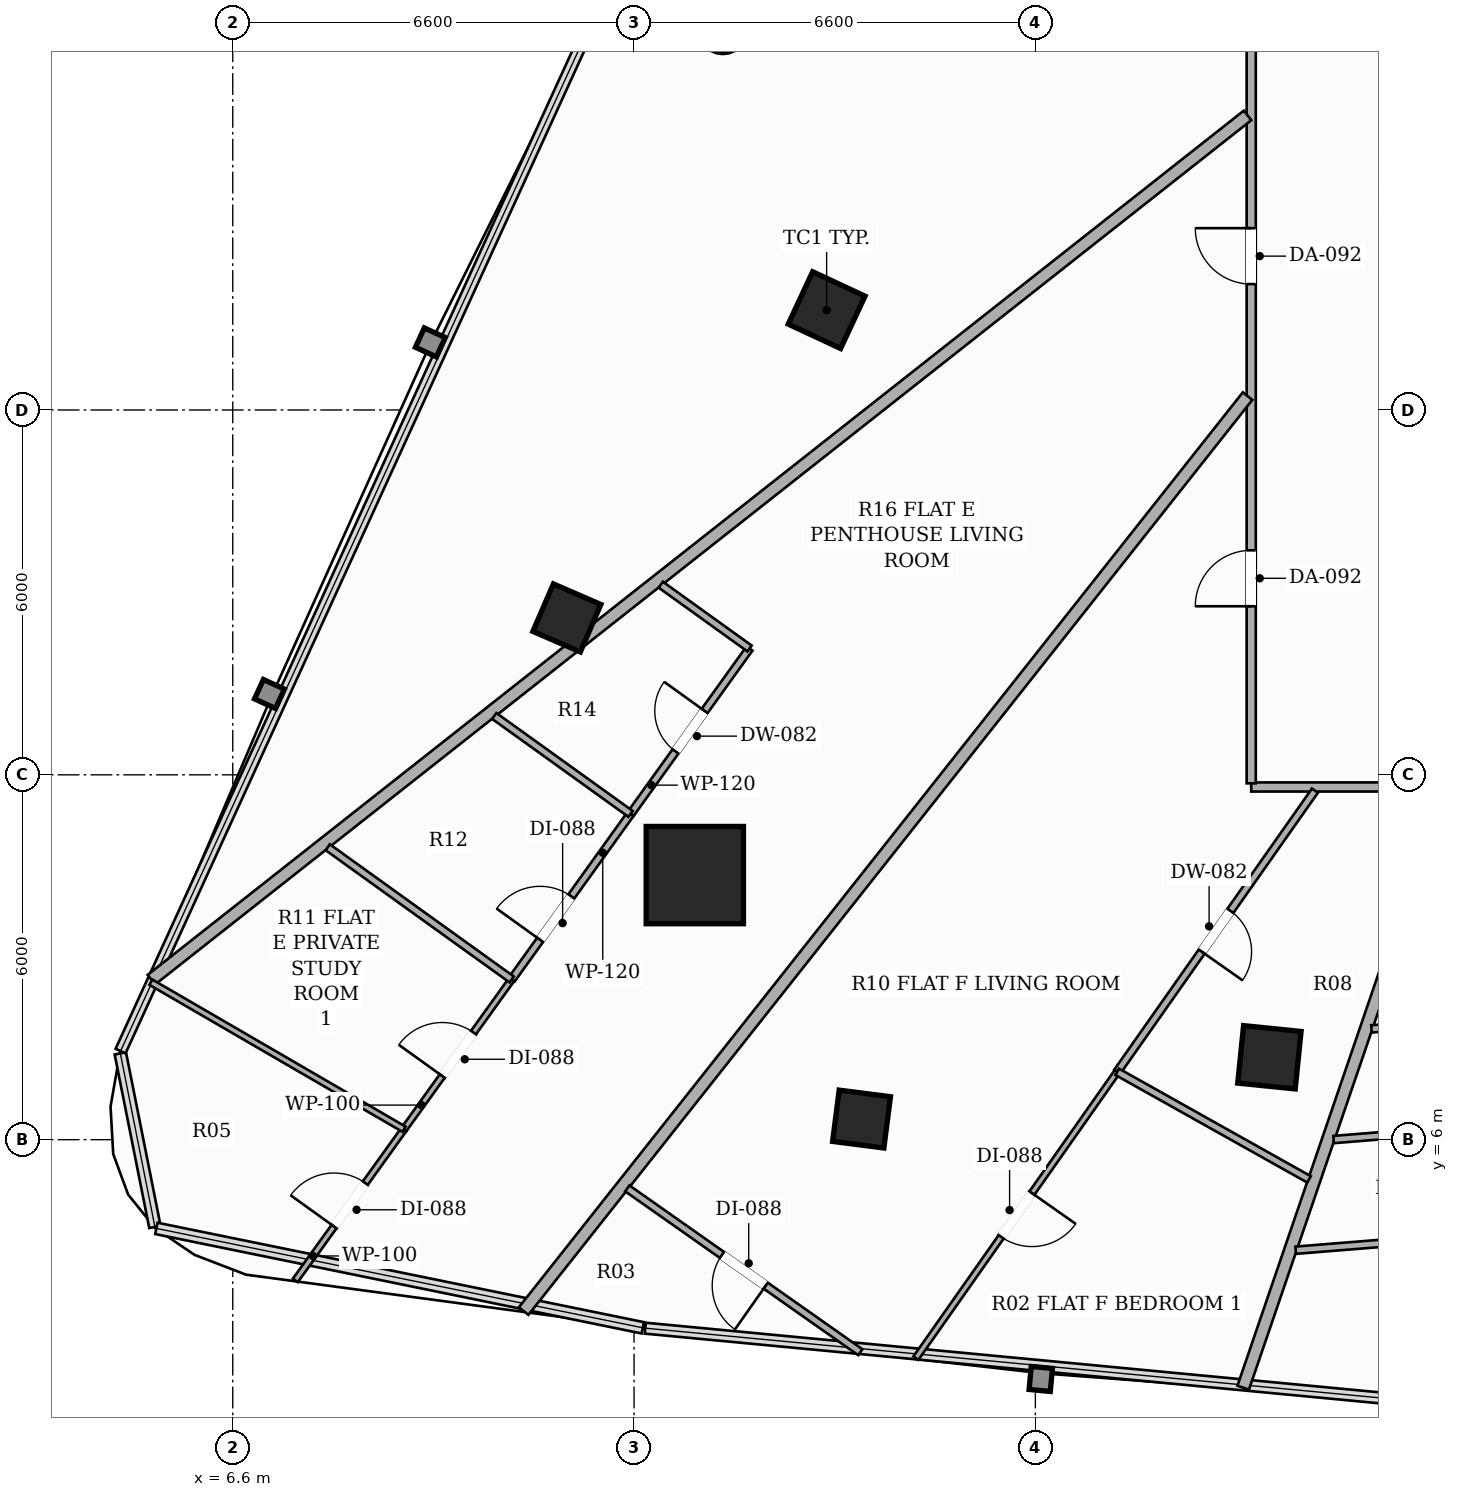
"""IFC4 building model, lengths in metres.
Left out: names, types, materials, properties, quantities, classifications, styles, units other than length and angle.
Written with IfcOpenShell. Run it as: python <this file> out.ifc"""

import sys

from ifc_helpers import new_model, si_unit, direction, frame, frame_2d, origin, origin_2d, place, context, subcontext, project, spatial, rectangle, hollow_rectangle, hollow_circle, extrude, element, fill, save


model = new_model("IFC4")
c1 = context("Model", 3, precision=1e-05, world=origin(), true_north=direction((0.0, 1.0)))
c2 = subcontext(c1, "Body", "Model", "MODEL_VIEW")
j1 = project(units=[si_unit("LENGTHUNIT", "METRE"), si_unit("PLANEANGLEUNIT", "RADIAN")], contexts=[c1])
p1 = place(None, origin())
s1 = spatial("IfcSite", under=j1, at=p1, CompositionType="ELEMENT")
p2 = place(p1, origin())
s2 = spatial("IfcBuilding", under=s1, at=p2, CompositionType="ELEMENT")
p3 = place(p2, frame((0.0, 0.0, 56.6)))
s3 = spatial("IfcBuildingStorey", under=s2, at=p3, CompositionType="ELEMENT", Elevation=56.6)
p4 = place(p3, frame((14.199, 10.351, 0.0), z_axis=(0.0, 0.0, 1.0), x_axis=(1.0, 0.0, 0.0)))
e1 = element("IfcColumn", 1, at=p4, inside=s3, PredefinedType="COLUMN", context=c2, shape_type="SweptSolid", body=[
    extrude(hollow_rectangle(XDim=1.6, YDim=1.6, WallThickness=0.05, at=origin_2d()), origin(), (0.0, 0.0, 1.0), 3.3),
])
for number, where, z_axis, x_axis in (
    (2, (16.367, 19.642, 0.0), (0.0, 0.0, 1.0), (0.423, 0.906, 0.0)),
    (3, (23.649, 7.355, 0.0), (0.0, 0.0, 1.0), (-0.995, 0.101, 0.0)),
):
    element("IfcColumn", number, at=place(p3, frame(where, z_axis=z_axis, x_axis=x_axis)), inside=s3, PredefinedType="COLUMN", context=c2, shape_type="SweptSolid", body=[
        extrude(hollow_rectangle(XDim=0.95, YDim=0.95, WallThickness=0.032, at=origin_2d()), origin(), (0.0, 0.0, 1.0), 3.3),
    ])
for number, where, z_axis, x_axis in (
    (4, (12.095, 14.58, 0.0), (0.0, 0.0, 1.0), (0.397, 0.918, 0.0)),
    (5, (16.941, 6.339, 0.0), (0.0, 0.0, 1.0), (-0.992, 0.127, 0.0)),
):
    element("IfcColumn", number, at=place(p3, frame(where, z_axis=z_axis, x_axis=x_axis)), inside=s3, PredefinedType="COLUMN", context=c2, shape_type="SweptSolid", body=[
        extrude(hollow_rectangle(XDim=0.85, YDim=0.85, WallThickness=0.028, at=origin_2d()), origin(), (0.0, 0.0, 1.0), 3.3),
    ])
p5 = place(p3, frame((14.662, 24.256, 0.0), z_axis=(0.0, 0.0, 1.0), x_axis=(1.0, 0.0, 0.0)))
e6 = element("IfcColumn", 6, at=p5, inside=s3, PredefinedType="COLUMN", context=c2, shape_type="SweptSolid", body=[
    extrude(hollow_circle(Radius=0.381, WallThickness=0.022, at=origin_2d()), origin(), (0.0, 0.0, 1.0), 3.3),
])
p6 = place(p3, frame((42.59, 11.8, 0.0), z_axis=(0.0, 0.0, 1.0), x_axis=(-1.0, 0.0, 0.0)))
e7 = element("IfcWall", 7, at=p6, inside=s3, PredefinedType="PARTITIONING", context=c2, shape_type="SweptSolid", body=[
    extrude(rectangle(XDim=19.24, YDim=0.15, at=frame_2d((9.62, 0.0))), origin(), (0.0, 0.0, 1.0), 2.629),
])
p7 = place(p6, frame((11.355, 0.0, 0.0)))
e8 = element("IfcOpeningElement", 8, at=p7, cuts=e7, PredefinedType="OPENING", context=c2, shape_type="SweptSolid", body=[
    extrude(rectangle(XDim=0.92, YDim=2.15, at=frame_2d((0.46, 1.075))), frame((0.0, 0.085, 0.0), z_axis=(0.0, -1.0, 0.0), x_axis=(1.0, 0.0, 0.0)), (0.0, 0.0, 1.0), 0.17),
])
p8 = place(p6, frame((3.524, 0.0, 0.0)))
e9 = element("IfcOpeningElement", 9, at=p8, cuts=e7, PredefinedType="OPENING", context=c2, shape_type="SweptSolid", body=[
    extrude(rectangle(XDim=0.88, YDim=2.1, at=frame_2d((0.44, 1.05))), frame((0.0, 0.085, 0.0), z_axis=(0.0, -1.0, 0.0), x_axis=(1.0, 0.0, 0.0)), (0.0, 0.0, 1.0), 0.17),
])
p9 = place(p3, frame((23.35, 11.86, 0.0), z_axis=(0.0, 0.0, 1.0), x_axis=(0.0, 1.0, 0.0)))
e10 = element("IfcWall", 10, at=p9, inside=s3, PredefinedType="PARTITIONING", context=c2, shape_type="SweptSolid", body=[
    extrude(rectangle(XDim=25.04, YDim=0.15, at=frame_2d((12.52, 0.0))), origin(), (0.0, 0.0, 1.0), 2.373),
])
p10 = place(p9, frame((15.434, 0.0, 0.0)))
e11 = element("IfcOpeningElement", 11, at=p10, cuts=e10, PredefinedType="OPENING", context=c2, shape_type="SweptSolid", body=[
    extrude(rectangle(XDim=0.88, YDim=2.1, at=frame_2d((0.44, 1.05))), frame((0.0, 0.085, 0.0), z_axis=(0.0, -1.0, 0.0), x_axis=(1.0, 0.0, 0.0)), (0.0, 0.0, 1.0), 0.17),
])
p11 = place(p9, frame((22.315, 0.0, 0.0)))
e12 = element("IfcOpeningElement", 12, at=p11, cuts=e10, PredefinedType="OPENING", context=c2, shape_type="SweptSolid", body=[
    extrude(rectangle(XDim=0.88, YDim=2.1, at=frame_2d((0.44, 1.05))), frame((0.0, 0.085, 0.0), z_axis=(0.0, -1.0, 0.0), x_axis=(1.0, 0.0, 0.0)), (0.0, 0.0, 1.0), 0.17),
])
p12 = place(p9, frame((8.21, 0.0, 0.0)))
e13 = element("IfcOpeningElement", 13, at=p12, cuts=e10, PredefinedType="OPENING", context=c2, shape_type="SweptSolid", body=[
    extrude(rectangle(XDim=0.92, YDim=2.15, at=frame_2d((0.46, 1.075))), frame((0.0, 0.085, 0.0), z_axis=(0.0, -1.0, 0.0), x_axis=(1.0, 0.0, 0.0)), (0.0, 0.0, 1.0), 0.17),
])
p13 = place(p9, frame((2.912, 0.0, 0.0)))
e14 = element("IfcOpeningElement", 14, at=p13, cuts=e10, PredefinedType="OPENING", context=c2, shape_type="SweptSolid", body=[
    extrude(rectangle(XDim=0.92, YDim=2.15, at=frame_2d((0.46, 1.075))), frame((0.0, 0.085, 0.0), z_axis=(0.0, -1.0, 0.0), x_axis=(1.0, 0.0, 0.0)), (0.0, 0.0, 1.0), 0.17),
])
p14 = place(p3, frame((23.29, 22.844, 0.0), z_axis=(0.0, 0.0, 1.0), x_axis=(-0.785302077685, -0.619112790034, 0.0)))
e15 = element("IfcWall", 15, at=p14, inside=s3, PredefinedType="PARTITIONING", context=c2, shape_type="SweptSolid", body=[
    extrude(rectangle(XDim=22.957, YDim=0.2, at=frame_2d((11.479, 0.0))), origin(), (0.0, 0.0, 1.0), 2.373),
])
p15 = place(p3, frame((23.29, 18.228, 0.0), z_axis=(0.0, 0.0, 1.0), x_axis=(-0.620501189922, -0.784205504511, 0.0)))
e16 = element("IfcWall", 16, at=p15, inside=s3, PredefinedType="PARTITIONING", context=c2, shape_type="SweptSolid", body=[
    extrude(rectangle(XDim=19.188, YDim=0.2, at=frame_2d((9.594, 0.0))), origin(), (0.0, 0.0, 1.0), 2.373),
])
p16 = place(p3, frame((26.579, 11.74, 0.0), z_axis=(0.0, 0.0, 1.0), x_axis=(-0.32385337678, -0.946107282684, 0.0)))
e17 = element("IfcWall", 17, at=p16, inside=s3, PredefinedType="PARTITIONING", context=c2, shape_type="SweptSolid", body=[
    extrude(rectangle(XDim=10.378, YDim=0.2, at=frame_2d((5.189, 0.0))), origin(), (0.0, 0.0, 1.0), 2.373),
])
p17 = place(p3, frame((13.143, 11.357, 0.0), z_axis=(0.0, 0.0, 1.0), x_axis=(0.583709603858, 0.811962498127, 0.0)))
e18 = element("IfcWall", 18, at=p17, inside=s3, PredefinedType="PARTITIONING", context=c2, shape_type="SweptSolid", body=[
    extrude(rectangle(XDim=3.351, YDim=0.12, at=frame_2d((1.676, 0.0))), origin(), (0.0, 0.0, 1.0), 2.373),
])
p18 = place(p17, frame((1.266, 0.0, 0.0)))
e19 = element("IfcOpeningElement", 19, at=p18, cuts=e18, PredefinedType="OPENING", context=c2, shape_type="SweptSolid", body=[
    extrude(rectangle(XDim=0.82, YDim=2.1, at=frame_2d((0.41, 1.05))), frame((0.0, 0.07, 0.0), z_axis=(0.0, -1.0, 0.0), x_axis=(1.0, 0.0, 0.0)), (0.0, 0.0, 1.0), 0.14),
])
p19 = place(p3, frame((15.099, 14.078, 0.0), z_axis=(0.0, 0.0, 1.0), x_axis=(-0.812134003072, 0.583470959906, 0.0)))
e20 = element("IfcWall", 20, at=p19, inside=s3, PredefinedType="PARTITIONING", context=c2, shape_type="SweptSolid", body=[
    extrude(rectangle(XDim=1.798, YDim=0.12, at=frame_2d((0.899, 0.0))), origin(), (0.0, 0.0, 1.0), 3.02),
])
p20 = place(p3, frame((11.187, 8.635, 0.0), z_axis=(0.0, 0.0, 1.0), x_axis=(0.583571510595, 0.812061753823, 0.0)))
e21 = element("IfcWall", 21, at=p20, inside=s3, PredefinedType="PARTITIONING", context=c2, shape_type="SweptSolid", body=[
    extrude(rectangle(XDim=3.352, YDim=0.12, at=frame_2d((1.676, 0.0))), origin(), (0.0, 0.0, 1.0), 2.579),
])
p21 = place(p20, frame((0.802, 0.0, 0.0)))
e22 = element("IfcOpeningElement", 22, at=p21, cuts=e21, PredefinedType="OPENING", context=c2, shape_type="SweptSolid", body=[
    extrude(rectangle(XDim=0.88, YDim=2.1, at=frame_2d((0.44, 1.05))), frame((0.0, 0.07, 0.0), z_axis=(0.0, -1.0, 0.0), x_axis=(1.0, 0.0, 0.0)), (0.0, 0.0, 1.0), 0.14),
])
p22 = place(p3, frame((7.629, 3.685, 0.0), z_axis=(0.0, 0.0, 1.0), x_axis=(0.583746077317, 0.811936276574, 0.0)))
e23 = element("IfcWall", 23, at=p22, inside=s3, PredefinedType="PARTITIONING", context=c2, shape_type="SweptSolid", body=[
    extrude(rectangle(XDim=3.063, YDim=0.1, at=frame_2d((1.532, 0.0))), origin(), (0.0, 0.0, 1.0), 3.02),
])
p23 = place(p22, frame((1.092, 0.0, 0.0)))
e24 = element("IfcOpeningElement", 24, at=p23, cuts=e23, PredefinedType="OPENING", context=c2, shape_type="SweptSolid", body=[
    extrude(rectangle(XDim=0.88, YDim=2.1, at=frame_2d((0.44, 1.05))), frame((0.0, 0.06, 0.0), z_axis=(0.0, -1.0, 0.0), x_axis=(1.0, 0.0, 0.0)), (0.0, 0.0, 1.0), 0.12),
])
p24 = place(p3, frame((9.417, 6.172, 0.0), z_axis=(0.0, 0.0, 1.0), x_axis=(0.583596240012, 0.812043981964, 0.0)))
e25 = element("IfcWall", 25, at=p24, inside=s3, PredefinedType="PARTITIONING", context=c2, shape_type="SweptSolid", body=[
    extrude(rectangle(XDim=3.033, YDim=0.1, at=frame_2d((1.517, 0.0))), origin(), (0.0, 0.0, 1.0), 2.579),
])
p25 = place(p24, frame((1.077, 0.0, 0.0)))
e26 = element("IfcOpeningElement", 26, at=p25, cuts=e25, PredefinedType="OPENING", context=c2, shape_type="SweptSolid", body=[
    extrude(rectangle(XDim=0.88, YDim=2.1, at=frame_2d((0.44, 1.05))), frame((0.0, 0.06, 0.0), z_axis=(0.0, -1.0, 0.0), x_axis=(1.0, 0.0, 0.0)), (0.0, 0.0, 1.0), 0.12),
])
p26 = place(p3, frame((13.143, 11.357, 0.0), z_axis=(0.0, 0.0, 1.0), x_axis=(-0.812099176387, 0.583519432162, 0.0)))
e27 = element("IfcWall", 27, at=p26, inside=s3, PredefinedType="PARTITIONING", context=c2, shape_type="SweptSolid", body=[
    extrude(rectangle(XDim=2.761, YDim=0.12, at=frame_2d((1.38, 0.0))), origin(), (0.0, 0.0, 1.0), 3.02),
])
p27 = place(p3, frame((11.187, 8.635, 0.0), z_axis=(0.0, 0.0, 1.0), x_axis=(-0.812025077548, 0.583622543629, 0.0)))
e28 = element("IfcWall", 28, at=p27, inside=s3, PredefinedType="PARTITIONING", context=c2, shape_type="SweptSolid", body=[
    extrude(rectangle(XDim=3.725, YDim=0.12, at=frame_2d((1.863, 0.0))), origin(), (0.0, 0.0, 1.0), 2.579),
])
p28 = place(p3, frame((5.253, 8.59, 0.0), z_axis=(0.0, 0.0, 1.0), x_axis=(0.864777582771, -0.502155087932, 0.0)))
e29 = element("IfcWall", 29, at=p28, inside=s3, PredefinedType="PARTITIONING", context=c2, shape_type="SweptSolid", body=[
    extrude(rectangle(XDim=4.815, YDim=0.1, at=frame_2d((2.408, 0.0))), origin(), (0.0, 0.0, 1.0), 3.02),
])
p29 = place(p3, frame((24.398, 11.74, 0.0), z_axis=(0.0, 0.0, 1.0), x_axis=(-0.575258030062, -0.817972003707, 0.0)))
e30 = element("IfcWall", 30, at=p29, inside=s3, PredefinedType="PARTITIONING", context=c2, shape_type="SweptSolid", body=[
    extrude(rectangle(XDim=5.653, YDim=0.12, at=frame_2d((2.827, 0.0))), origin(), (0.0, 0.0, 1.0), 2.373),
])
p30 = place(p29, frame((2.417, 0.0, 0.0)))
e31 = element("IfcOpeningElement", 31, at=p30, cuts=e30, PredefinedType="OPENING", context=c2, shape_type="SweptSolid", body=[
    extrude(rectangle(XDim=0.82, YDim=2.1, at=frame_2d((0.41, 1.05))), frame((0.0, 0.07, 0.0), z_axis=(0.0, -1.0, 0.0), x_axis=(1.0, 0.0, 0.0)), (0.0, 0.0, 1.0), 0.14),
])
p31 = place(p3, frame((16.921, 2.505, 0.0), z_axis=(0.0, 0.0, 1.0), x_axis=(-0.818042569522, 0.575157677902, 0.0)))
e32 = element("IfcWall", 32, at=p31, inside=s3, PredefinedType="PARTITIONING", context=c2, shape_type="SweptSolid", body=[
    extrude(rectangle(XDim=4.684, YDim=0.12, at=frame_2d((2.342, 0.0))), origin(), (0.0, 0.0, 1.0), 2.579),
])
p32 = place(p31, frame((1.902, 0.0, 0.0)))
e33 = element("IfcOpeningElement", 33, at=p32, cuts=e32, PredefinedType="OPENING", context=c2, shape_type="SweptSolid", body=[
    extrude(rectangle(XDim=0.88, YDim=2.1, at=frame_2d((0.44, 1.05))), frame((0.0, 0.07, 0.0), z_axis=(0.0, -1.0, 0.0), x_axis=(1.0, 0.0, 0.0)), (0.0, 0.0, 1.0), 0.14),
])
p33 = place(p3, frame((21.146, 7.116, 0.0), z_axis=(0.0, 0.0, 1.0), x_axis=(-0.575180299529, -0.818026664011, 0.0)))
e34 = element("IfcWall", 34, at=p33, inside=s3, PredefinedType="PARTITIONING", context=c2, shape_type="SweptSolid", body=[
    extrude(rectangle(XDim=5.757, YDim=0.1, at=frame_2d((2.878, 0.0))), origin(), (0.0, 0.0, 1.0), 2.373),
])
p34 = place(p33, frame((2.438, 0.0, 0.0)))
e35 = element("IfcOpeningElement", 35, at=p34, cuts=e34, PredefinedType="OPENING", context=c2, shape_type="SweptSolid", body=[
    extrude(rectangle(XDim=0.88, YDim=2.1, at=frame_2d((0.44, 1.05))), frame((0.0, 0.06, 0.0), z_axis=(0.0, -1.0, 0.0), x_axis=(1.0, 0.0, 0.0)), (0.0, 0.0, 1.0), 0.12),
])
p35 = place(p3, frame((24.301, 5.347, 0.0), z_axis=(0.0, 0.0, 1.0), x_axis=(-0.872243471816, 0.48907190256, 0.0)))
e36 = element("IfcWall", 36, at=p35, inside=s3, PredefinedType="PARTITIONING", context=c2, shape_type="SweptSolid", body=[
    extrude(rectangle(XDim=3.617, YDim=0.12, at=frame_2d((1.809, 0.0))), origin(), (0.0, 0.0, 1.0), 2.373),
])
p36 = place(p3, frame((27.909, 8.03, 0.0), z_axis=(0.0, 0.0, 1.0), x_axis=(-0.996768339954, -0.080329798112, 0.0)))
e37 = element("IfcWall", 37, at=p36, inside=s3, PredefinedType="PARTITIONING", context=c2, shape_type="SweptSolid", body=[
    extrude(rectangle(XDim=2.589, YDim=0.12, at=frame_2d((1.295, 0.0))), origin(), (0.0, 0.0, 1.0), 3.02),
])
p37 = place(p36, frame((0.885, 0.0, 0.0)))
e38 = element("IfcOpeningElement", 38, at=p37, cuts=e37, PredefinedType="OPENING", context=c2, shape_type="SweptSolid", body=[
    extrude(rectangle(XDim=0.82, YDim=2.1, at=frame_2d((0.41, 1.05))), frame((0.0, 0.07, 0.0), z_axis=(0.0, -1.0, 0.0), x_axis=(1.0, 0.0, 0.0)), (0.0, 0.0, 1.0), 0.14),
])
p38 = place(p3, frame((28.05, 6.272, 0.0), z_axis=(0.0, 0.0, 1.0), x_axis=(-0.99675765278, -0.080462299392, 0.0)))
e39 = element("IfcWall", 39, at=p38, inside=s3, PredefinedType="PARTITIONING", context=c2, shape_type="SweptSolid", body=[
    extrude(rectangle(XDim=3.356, YDim=0.12, at=frame_2d((1.678, 0.0))), origin(), (0.0, 0.0, 1.0), 2.373),
])
p39 = place(p3, frame((28.192, 4.513, 0.0), z_axis=(0.0, 0.0, 1.0), x_axis=(-0.996771449714, -0.080291201486, 0.0)))
e40 = element("IfcWall", 40, at=p39, inside=s3, PredefinedType="PARTITIONING", context=c2, shape_type="SweptSolid", body=[
    extrude(rectangle(XDim=4.123, YDim=0.12, at=frame_2d((2.062, 0.0))), origin(), (0.0, 0.0, 1.0), 2.373),
])
p40 = place(p12, origin())
e41 = element("IfcDoor", 41, at=p40, inside=s3, OperationType="SINGLE_SWING_RIGHT", PredefinedType="DOOR", context=c2, shape_type="SweptSolid", body=[
    extrude(rectangle(XDim=0.92, YDim=2.15, at=frame_2d((0.46, 1.075))), frame((0.0, 0.025, 0.0), z_axis=(0.0, -1.0, 0.0), x_axis=(1.0, 0.0, 0.0)), (0.0, 0.0, 1.0), 0.05),
])
fill(e13, e41)
p41 = place(p18, origin())
e42 = element("IfcDoor", 42, at=p41, inside=s3, OperationType="SINGLE_SWING_RIGHT", PredefinedType="DOOR", context=c2, shape_type="SweptSolid", body=[
    extrude(rectangle(XDim=0.82, YDim=2.1, at=frame_2d((0.41, 1.05))), frame((0.0, 0.025, 0.0), z_axis=(0.0, -1.0, 0.0), x_axis=(1.0, 0.0, 0.0)), (0.0, 0.0, 1.0), 0.05),
])
fill(e19, e42)
p42 = place(p21, origin())
e43 = element("IfcDoor", 43, at=p42, inside=s3, OperationType="SINGLE_SWING_LEFT", PredefinedType="DOOR", context=c2, shape_type="SweptSolid", body=[
    extrude(rectangle(XDim=0.88, YDim=2.1, at=frame_2d((0.44, 1.05))), frame((0.0, 0.025, 0.0), z_axis=(0.0, -1.0, 0.0), x_axis=(1.0, 0.0, 0.0)), (0.0, 0.0, 1.0), 0.05),
])
fill(e22, e43)
p43 = place(p23, origin())
e44 = element("IfcDoor", 44, at=p43, inside=s3, OperationType="SINGLE_SWING_LEFT", PredefinedType="DOOR", context=c2, shape_type="SweptSolid", body=[
    extrude(rectangle(XDim=0.88, YDim=2.1, at=frame_2d((0.44, 1.05))), frame((0.0, 0.025, 0.0), z_axis=(0.0, -1.0, 0.0), x_axis=(1.0, 0.0, 0.0)), (0.0, 0.0, 1.0), 0.05),
])
fill(e24, e44)
p44 = place(p25, origin())
e45 = element("IfcDoor", 45, at=p44, inside=s3, OperationType="SINGLE_SWING_LEFT", PredefinedType="DOOR", context=c2, shape_type="SweptSolid", body=[
    extrude(rectangle(XDim=0.88, YDim=2.1, at=frame_2d((0.44, 1.05))), frame((0.0, 0.025, 0.0), z_axis=(0.0, -1.0, 0.0), x_axis=(1.0, 0.0, 0.0)), (0.0, 0.0, 1.0), 0.05),
])
fill(e26, e45)
p45 = place(p13, origin())
e46 = element("IfcDoor", 46, at=p45, inside=s3, OperationType="SINGLE_SWING_LEFT", PredefinedType="DOOR", context=c2, shape_type="SweptSolid", body=[
    extrude(rectangle(XDim=0.92, YDim=2.15, at=frame_2d((0.46, 1.075))), frame((0.0, 0.025, 0.0), z_axis=(0.0, -1.0, 0.0), x_axis=(1.0, 0.0, 0.0)), (0.0, 0.0, 1.0), 0.05),
])
fill(e14, e46)
p46 = place(p30, origin())
e47 = element("IfcDoor", 47, at=p46, inside=s3, OperationType="SINGLE_SWING_RIGHT", PredefinedType="DOOR", context=c2, shape_type="SweptSolid", body=[
    extrude(rectangle(XDim=0.82, YDim=2.1, at=frame_2d((0.41, 1.05))), frame((0.0, 0.025, 0.0), z_axis=(0.0, -1.0, 0.0), x_axis=(1.0, 0.0, 0.0)), (0.0, 0.0, 1.0), 0.05),
])
fill(e31, e47)
p47 = place(p32, origin())
e48 = element("IfcDoor", 48, at=p47, inside=s3, OperationType="SINGLE_SWING_LEFT", PredefinedType="DOOR", context=c2, shape_type="SweptSolid", body=[
    extrude(rectangle(XDim=0.88, YDim=2.1, at=frame_2d((0.44, 1.05))), frame((0.0, 0.025, 0.0), z_axis=(0.0, -1.0, 0.0), x_axis=(1.0, 0.0, 0.0)), (0.0, 0.0, 1.0), 0.05),
])
fill(e33, e48)
p48 = place(p34, origin())
e49 = element("IfcDoor", 49, at=p48, inside=s3, OperationType="SINGLE_SWING_LEFT", PredefinedType="DOOR", context=c2, shape_type="SweptSolid", body=[
    extrude(rectangle(XDim=0.88, YDim=2.1, at=frame_2d((0.44, 1.05))), frame((0.0, 0.025, 0.0), z_axis=(0.0, -1.0, 0.0), x_axis=(1.0, 0.0, 0.0)), (0.0, 0.0, 1.0), 0.05),
])
fill(e35, e49)
save(model, sys.argv[1])
